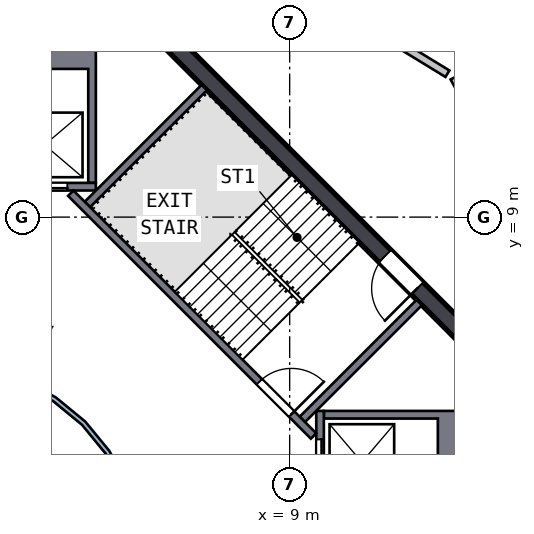
"""IFC4 building model, lengths in metres.
Left out: names, types, materials, properties, quantities, classifications, styles, units other than length and angle.
Written with IfcOpenShell. Run it as: python <this file> out.ifc"""

import sys

from ifc_helpers import new_model, si_unit, direction, frame, frame_2d, origin, place, context, subcontext, project, spatial, polyline, rectangle, outline, extrude, element, fill, save


model = new_model("IFC4")
c1 = context("Model", 3, precision=1e-05, world=origin(), true_north=direction((0.0, 1.0)))
c2 = subcontext(c1, "Body", "Model", "MODEL_VIEW")
j1 = project(units=[si_unit("LENGTHUNIT", "METRE"), si_unit("PLANEANGLEUNIT", "RADIAN")], contexts=[c1])
p1 = place(None, origin())
s1 = spatial("IfcSite", under=j1, at=p1, CompositionType="ELEMENT")
p2 = place(p1, origin())
s2 = spatial("IfcBuilding", under=s1, at=p2, CompositionType="ELEMENT")
p3 = place(p2, frame((0.0, 0.0, 274.0)))
s3 = spatial("IfcBuildingStorey", under=s2, at=p3, CompositionType="ELEMENT", Elevation=274.0)
p4 = place(p3, frame((13.841, 5.64, 0.0), z_axis=(0.0, 0.0, 1.0), x_axis=(-0.707106781, 0.707106781, 0.0)))
e1 = element("IfcWall", 1, at=p4, inside=s3, PredefinedType="SHEAR", context=c2, shape_type="SweptSolid", body=[
    extrude(rectangle(XDim=11.598, YDim=0.45, at=frame_2d((5.799, 0.0))), origin(), (0.0, 0.0, 1.0), 3.5),
])
p5 = place(p4, frame((2.099, 0.0, 0.0)))
e2 = element("IfcOpeningElement", 2, at=p5, cuts=e1, PredefinedType="OPENING", context=c2, shape_type="SweptSolid", body=[
    extrude(rectangle(XDim=1.2, YDim=2.1, at=frame_2d((0.6, 1.05))), frame((0.0, 0.235, 0.0), z_axis=(0.0, -1.0, 0.0), x_axis=(1.0, 0.0, 0.0)), (0.0, 0.0, 1.0), 0.47),
])
p6 = place(p3, origin())
e3 = element("IfcWall", 3, at=p6, inside=s3, PredefinedType="SOLIDWALL", context=c2, shape_type="SweptSolid", body=[
    extrude(outline(polyline([(13.55, 3.9), (13.55, 1.2), (9.9, 1.2), (9.9, 1.4), (12.9, 1.4), (12.9, 3.7), (9.9, 3.7), (9.9, 3.9), (13.55, 3.9)])), origin(), (0.0, 0.0, 1.0), 3.19),
])
p7 = place(p3, frame((9.8, 1.2, 0.0), z_axis=(0.0, 0.0, 1.0), x_axis=(0.0, 1.0, 0.0)))
e4 = element("IfcWall", 4, at=p7, inside=s3, PredefinedType="SOLIDWALL", context=c2, shape_type="SweptSolid", body=[
    extrude(rectangle(XDim=2.7, YDim=0.2, at=frame_2d((1.35, 0.0))), origin(), (0.0, 0.0, 1.0), 3.19),
])
p8 = place(p7, frame((0.75, 0.0, 0.0)))
e5 = element("IfcOpeningElement", 5, at=p8, cuts=e4, PredefinedType="OPENING", context=c2, shape_type="SweptSolid", body=[
    extrude(rectangle(XDim=1.2, YDim=2.1, at=frame_2d((0.6, 1.05))), frame((0.0, 0.11, 0.0), z_axis=(0.0, -1.0, 0.0), x_axis=(1.0, 0.0, 0.0)), (0.0, 0.0, 1.0), 0.22),
])
p9 = place(p3, origin())
e6 = element("IfcWall", 6, at=p9, inside=s3, PredefinedType="SOLIDWALL", context=c2, shape_type="SweptSolid", body=[
    extrude(outline(polyline([(3.9, 9.9), (3.7, 9.9), (3.7, 12.9), (1.4, 12.9), (1.4, 9.9), (1.2, 9.9), (1.2, 13.55), (3.9, 13.55), (3.9, 9.9)])), origin(), (0.0, 0.0, 1.0), 3.19),
])
p10 = place(p3, frame((1.2, 9.8, 0.0), z_axis=(0.0, 0.0, 1.0), x_axis=(1.0, 0.0, 0.0)))
e7 = element("IfcWall", 7, at=p10, inside=s3, PredefinedType="SOLIDWALL", context=c2, shape_type="SweptSolid", body=[
    extrude(rectangle(XDim=2.7, YDim=0.2, at=frame_2d((1.35, 0.0))), origin(), (0.0, 0.0, 1.0), 3.19),
])
p11 = place(p10, frame((0.75, 0.0, 0.0)))
e8 = element("IfcOpeningElement", 8, at=p11, cuts=e7, PredefinedType="OPENING", context=c2, shape_type="SweptSolid", body=[
    extrude(rectangle(XDim=1.2, YDim=2.1, at=frame_2d((0.6, 1.05))), frame((0.0, 0.11, 0.0), z_axis=(0.0, -1.0, 0.0), x_axis=(1.0, 0.0, 0.0)), (0.0, 0.0, 1.0), 0.22),
])
p12 = place(p3, frame((3.24, 9.629, 0.0), z_axis=(0.0, 0.0, 1.0), x_axis=(0.707106781, -0.707106781, 0.0)))
e9 = element("IfcWall", 9, at=p12, inside=s3, PredefinedType="SOLIDWALL", context=c2, shape_type="SweptSolid", body=[
    extrude(rectangle(XDim=9.036, YDim=0.2, at=frame_2d((4.518, 0.0))), origin(), (0.0, 0.0, 1.0), 3.19),
])
p13 = place(p12, frame((7.018, 0.0, 0.0)))
e10 = element("IfcOpeningElement", 10, at=p13, cuts=e9, PredefinedType="OPENING", context=c2, shape_type="SweptSolid", body=[
    extrude(rectangle(XDim=1.2, YDim=2.1, at=frame_2d((0.6, 1.05))), frame((0.0, 0.11, 0.0), z_axis=(0.0, -1.0, 0.0), x_axis=(1.0, 0.0, 0.0)), (0.0, 0.0, 1.0), 0.22),
])
for number, where, z_axis, x_axis in (
    (11, (9.334, 3.677, 0.0), (0.0, 0.0, 1.0), (0.707, 0.707, 0.0)),
    (12, (3.677, 9.334, 0.0), (0.0, 0.0, 1.0), (0.707, 0.707, 0.0)),
):
    element("IfcWall", number, at=place(p3, frame(where, z_axis=z_axis, x_axis=x_axis)), inside=s3, PredefinedType="SOLIDWALL", context=c2, shape_type="SweptSolid", body=[
        extrude(rectangle(XDim=4.35, YDim=0.2, at=frame_2d((2.175, 0.0))), origin(), (0.0, 0.0, 1.0), 3.19),
    ])
p14 = place(p3, origin())
e13 = element("IfcWall", 13, at=p14, inside=s3, PredefinedType="SOLIDWALL", context=c2, shape_type="SweptSolid", body=[
    extrude(outline(polyline([(5.021, -0.999), (4.73, -1.959), (4.257, -2.844), (3.62, -3.62), (2.844, -4.257), (1.959, -4.73), (0.999, -5.021), (0.0, -5.12), (-0.999, -5.021), (-1.959, -4.73), (-2.844, -4.257), (-3.62, -3.62), (-4.257, -2.844), (-4.73, -1.959), (-5.021, -0.999), (-5.12, 0.0), (-5.021, 0.999), (-4.73, 1.959), (-4.257, 2.844), (-3.62, 3.62), (-2.844, 4.257), (-1.959, 4.73), (-0.999, 5.021), (0.0, 5.12), (0.999, 5.021), (1.959, 4.73), (2.844, 4.257), (3.62, 3.62), (4.257, 2.844), (4.73, 1.959), (5.021, 0.999), (5.12, 0.0), (5.021, -0.999)]), holes=[polyline([(4.904, 0.976), (4.619, 1.913), (4.157, 2.778), (3.535, 3.535), (2.778, 4.157), (1.913, 4.619), (0.976, 4.904), (0.0, 5.0), (-0.976, 4.904), (-1.913, 4.619), (-2.778, 4.157), (-3.535, 3.535), (-4.157, 2.778), (-4.619, 1.913), (-4.904, 0.976), (-5.0, 0.0), (-4.904, -0.976), (-4.619, -1.913), (-4.157, -2.778), (-3.535, -3.535), (-2.778, -4.157), (-1.913, -4.619), (-0.976, -4.904), (0.0, -5.0), (0.976, -4.904), (1.913, -4.619), (2.778, -4.157), (3.535, -3.535), (4.157, -2.778), (4.619, -1.913), (4.904, -0.976), (5.0, 0.0), (4.904, 0.976)])]), origin(), (0.0, 0.0, 1.0), 3.19),
])
p15 = place(p3, frame((5.204, 17.633, 0.0), z_axis=(0.0, 0.0, 1.0), x_axis=(0.853192423, -0.521596289, 0.0)))
e14 = element("IfcWall", 14, at=p15, inside=s3, PredefinedType="SOLIDWALL", context=c2, shape_type="SweptSolid", body=[
    extrude(rectangle(XDim=9.316, YDim=0.2, at=frame_2d((4.658, 0.0))), origin(), (0.0, 0.0, 1.0), 3.19),
])
p16 = place(p15, frame((5.15, 0.0, 0.0)))
e15 = element("IfcOpeningElement", 15, at=p16, cuts=e14, PredefinedType="OPENING", context=c2, shape_type="SweptSolid", body=[
    extrude(rectangle(XDim=1.0, YDim=2.1, at=frame_2d((0.5, 1.05))), frame((0.0, 0.11, 0.0), z_axis=(0.0, -1.0, 0.0), x_axis=(1.0, 0.0, 0.0)), (0.0, 0.0, 1.0), 0.22),
])
p17 = place(p3, frame((13.323, 12.669, 0.0), z_axis=(0.0, 0.0, 1.0), x_axis=(0.478086253, -0.878312891, 0.0)))
e16 = element("IfcWall", 16, at=p17, inside=s3, PredefinedType="SOLIDWALL", context=c2, shape_type="SweptSolid", body=[
    extrude(rectangle(XDim=9.517, YDim=0.2, at=frame_2d((4.758, 0.0))), origin(), (0.0, 0.0, 1.0), 3.19),
])
p18 = place(p17, frame((3.869, 0.0, 0.0)))
e17 = element("IfcOpeningElement", 17, at=p18, cuts=e16, PredefinedType="OPENING", context=c2, shape_type="SweptSolid", body=[
    extrude(rectangle(XDim=1.8, YDim=2.1, at=frame_2d((0.9, 1.05))), frame((0.0, 0.11, 0.0), z_axis=(0.0, -1.0, 0.0), x_axis=(1.0, 0.0, 0.0)), (0.0, 0.0, 1.0), 0.22),
])
p19 = place(p8, origin())
e18 = element("IfcDoor", 18, at=p19, inside=s3, OperationType="DOUBLE_DOOR_SLIDING", PredefinedType="DOOR", context=c2, shape_type="SweptSolid", body=[
    extrude(rectangle(XDim=1.2, YDim=2.1, at=frame_2d((0.6, 1.05))), frame((0.0, 0.025, 0.0), z_axis=(0.0, -1.0, 0.0), x_axis=(1.0, 0.0, 0.0)), (0.0, 0.0, 1.0), 0.05),
])
fill(e5, e18)
p20 = place(p11, origin())
e19 = element("IfcDoor", 19, at=p20, inside=s3, OperationType="DOUBLE_DOOR_SLIDING", PredefinedType="DOOR", context=c2, shape_type="SweptSolid", body=[
    extrude(rectangle(XDim=1.2, YDim=2.1, at=frame_2d((0.6, 1.05))), frame((0.0, 0.025, 0.0), z_axis=(0.0, -1.0, 0.0), x_axis=(1.0, 0.0, 0.0)), (0.0, 0.0, 1.0), 0.05),
])
fill(e8, e19)
p21 = place(p13, origin())
e20 = element("IfcDoor", 20, at=p21, inside=s3, OperationType="SINGLE_SWING_RIGHT", PredefinedType="DOOR", context=c2, shape_type="SweptSolid", body=[
    extrude(rectangle(XDim=1.2, YDim=2.1, at=frame_2d((0.6, 1.05))), frame((0.0, 0.025, 0.0), z_axis=(0.0, -1.0, 0.0), x_axis=(1.0, 0.0, 0.0)), (0.0, 0.0, 1.0), 0.05),
])
fill(e10, e20)
p22 = place(p5, origin())
e21 = element("IfcDoor", 21, at=p22, inside=s3, OperationType="SINGLE_SWING_LEFT", PredefinedType="DOOR", context=c2, shape_type="SweptSolid", body=[
    extrude(rectangle(XDim=1.2, YDim=2.1, at=frame_2d((0.6, 1.05))), frame((0.0, 0.025, 0.0), z_axis=(0.0, -1.0, 0.0), x_axis=(1.0, 0.0, 0.0)), (0.0, 0.0, 1.0), 0.05),
])
fill(e2, e21)
save(model, sys.argv[1])
